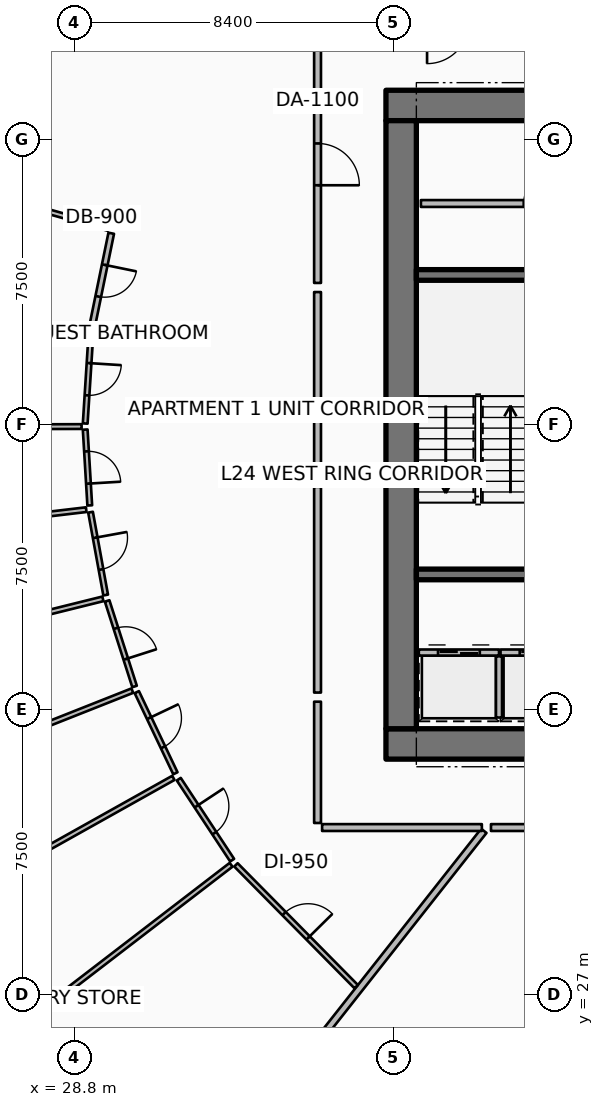
"""IFC4 building model, lengths in metres.
Left out: names, types, materials, properties, quantities, classifications, styles, units other than length and angle.
Written with IfcOpenShell. Run it as: python <this file> out.ifc"""

import sys

from ifc_helpers import new_model, si_unit, direction, frame, frame_2d, origin, place, context, subcontext, project, spatial, rectangle, extrude, element, fill, save


model = new_model("IFC4")
c1 = context("Model", 3, precision=1e-05, world=origin(), true_north=direction((0.0, 1.0)))
c2 = subcontext(c1, "Body", "Model", "MODEL_VIEW")
j1 = project(units=[si_unit("LENGTHUNIT", "METRE"), si_unit("PLANEANGLEUNIT", "RADIAN")], contexts=[c1])
p1 = place(None, origin())
s1 = spatial("IfcSite", under=j1, at=p1, CompositionType="ELEMENT")
p2 = place(p1, origin())
s2 = spatial("IfcBuilding", under=s1, at=p2, CompositionType="ELEMENT")
p3 = place(p2, frame((0.0, 0.0, 97.65)))
s3 = spatial("IfcBuildingStorey", under=s2, at=p3, CompositionType="ELEMENT", Elevation=97.65)
for number, where, z_axis, x_axis in (
    (1, (37.0, 33.6, 0.0), (0.0, 0.0, 1.0), (1.0, 0.0, 0.0)),
    (2, (37.0, 50.4, 0.0), (0.0, 0.0, 1.0), (1.0, 0.0, 0.0)),
):
    element("IfcWall", number, at=place(p3, frame(where, z_axis=z_axis, x_axis=x_axis)), inside=s3, PredefinedType="SHEAR", context=c2, shape_type="SweptSolid", body=[
        extrude(rectangle(XDim=9.9, YDim=0.8, at=frame_2d((4.95, 0.0))), origin(), (0.0, 0.0, 1.0), 3.75),
    ])
p4 = place(p3, frame((37.4, 34.0, 0.0), z_axis=(0.0, 0.0, 1.0), x_axis=(0.0, 1.0, 0.0)))
e3 = element("IfcWall", 3, at=p4, inside=s3, PredefinedType="SHEAR", context=c2, shape_type="SweptSolid", body=[
    extrude(rectangle(XDim=16.0, YDim=0.8, at=frame_2d((8.0, 0.0))), origin(), (0.0, 0.0, 1.0), 3.75),
])
for number, where, z_axis, x_axis in (
    (4, (37.8, 38.06, 0.0), (0.0, 0.0, 1.0), (1.0, 0.0, 0.0)),
    (5, (37.8, 45.94, 0.0), (0.0, 0.0, 1.0), (1.0, 0.0, 0.0)),
):
    element("IfcWall", number, at=place(p3, frame(where, z_axis=z_axis, x_axis=x_axis)), inside=s3, PredefinedType="SHEAR", context=c2, shape_type="SweptSolid", body=[
        extrude(rectangle(XDim=3.5, YDim=0.28, at=frame_2d((1.75, 0.0))), origin(), (0.0, 0.0, 1.0), 3.75),
    ])
p5 = place(p3, frame((37.865, 36.005, 0.0), z_axis=(0.0, 0.0, 1.0), x_axis=(1.0, 0.0, 0.0)))
e6 = element("IfcWall", 6, at=p5, inside=s3, PredefinedType="PARTITIONING", context=c2, shape_type="SweptSolid", body=[
    extrude(rectangle(XDim=2.11, YDim=0.16, at=frame_2d((1.055, 0.0))), origin(), (0.0, 0.0, 1.0), 3.5),
])
p6 = place(p5, frame((0.505, 0.0, 0.0)))
e7 = element("IfcOpeningElement", 7, at=p6, cuts=e6, PredefinedType="OPENING", context=c2, shape_type="SweptSolid", body=[
    extrude(rectangle(XDim=1.1, YDim=2.1, at=frame_2d((0.55, 1.05))), frame((0.0, 0.09, 0.0), z_axis=(0.0, -1.0, 0.0), x_axis=(1.0, 0.0, 0.0)), (0.0, 0.0, 1.0), 0.18),
])
p7 = place(p3, frame((39.975, 34.295, 0.0), z_axis=(0.0, 0.0, 1.0), x_axis=(0.0, 1.0, 0.0)))
e8 = element("IfcWall", 8, at=p7, inside=s3, PredefinedType="PARTITIONING", context=c2, shape_type="SweptSolid", body=[
    extrude(rectangle(XDim=1.61, YDim=0.16, at=frame_2d((0.805, 0.0))), origin(), (0.0, 0.0, 1.0), 3.5),
])
p8 = place(p3, frame((40.015, 36.005, 0.0), z_axis=(0.0, 0.0, 1.0), x_axis=(1.0, 0.0, 0.0)))
e9 = element("IfcWall", 9, at=p8, inside=s3, PredefinedType="PARTITIONING", context=c2, shape_type="SweptSolid", body=[
    extrude(rectangle(XDim=2.11, YDim=0.16, at=frame_2d((1.055, 0.0))), origin(), (0.0, 0.0, 1.0), 3.5),
])
p9 = place(p8, frame((0.505, 0.0, 0.0)))
e10 = element("IfcOpeningElement", 10, at=p9, cuts=e9, PredefinedType="OPENING", context=c2, shape_type="SweptSolid", body=[
    extrude(rectangle(XDim=1.1, YDim=2.1, at=frame_2d((0.55, 1.05))), frame((0.0, 0.09, 0.0), z_axis=(0.0, -1.0, 0.0), x_axis=(1.0, 0.0, 0.0)), (0.0, 0.0, 1.0), 0.18),
])
p10 = place(p3, frame((37.92, 47.82, 0.0), z_axis=(0.0, 0.0, 1.0), x_axis=(1.0, 0.0, 0.0)))
e11 = element("IfcWall", 11, at=p10, inside=s3, PredefinedType="PARTITIONING", context=c2, shape_type="SweptSolid", body=[
    extrude(rectangle(XDim=6.26, YDim=0.18, at=frame_2d((3.13, 0.0))), origin(), (0.0, 0.0, 1.0), 3.5),
])
p11 = place(p10, frame((2.705, 0.0, 0.0)))
e12 = element("IfcOpeningElement", 12, at=p11, cuts=e11, PredefinedType="OPENING", context=c2, shape_type="SweptSolid", body=[
    extrude(rectangle(XDim=0.85, YDim=2.06, at=frame_2d((0.425, 1.03))), frame((0.0, 0.1, 0.0), z_axis=(0.0, -1.0, 0.0), x_axis=(1.0, 0.0, 0.0)), (0.0, 0.0, 1.0), 0.2),
])
p12 = place(p3, frame((39.575, 31.314, 0.0), z_axis=(0.0, 0.0, 1.0), x_axis=(-0.619083417853, -0.785325233098, 0.0)))
e13 = element("IfcWall", 13, at=p12, inside=s3, PredefinedType="PARTITIONING", context=c2, shape_type="SweptSolid", body=[
    extrude(rectangle(XDim=15.063, YDim=0.18, at=frame_2d((7.532, 0.0))), origin(), (0.0, 0.0, 1.0), 2.94),
])
p13 = place(p3, frame((35.2, 51.971, 0.0), z_axis=(0.0, 0.0, 1.0), x_axis=(0.0, -1.0, 0.0)))
e14 = element("IfcWall", 14, at=p13, inside=s3, PredefinedType="PARTITIONING", context=c2, shape_type="SweptSolid", body=[
    extrude(rectangle(XDim=6.241, YDim=0.18, at=frame_2d((3.12, 0.0))), origin(), (0.0, 0.0, 1.0), 2.94),
])
p14 = place(p13, frame((2.57, 0.0, 0.0)))
e15 = element("IfcOpeningElement", 15, at=p14, cuts=e14, PredefinedType="OPENING", context=c2, shape_type="SweptSolid", body=[
    extrude(rectangle(XDim=1.1, YDim=2.1, at=frame_2d((0.55, 1.05))), frame((0.0, 0.1, 0.0), z_axis=(0.0, -1.0, 0.0), x_axis=(1.0, 0.0, 0.0)), (0.0, 0.0, 1.0), 0.2),
])
p15 = place(p3, frame((35.2, 45.49, 0.0), z_axis=(0.0, 0.0, 1.0), x_axis=(0.0, -1.0, 0.0)))
e16 = element("IfcWall", 16, at=p15, inside=s3, PredefinedType="PARTITIONING", context=c2, shape_type="SweptSolid", body=[
    extrude(rectangle(XDim=4.885, YDim=0.18, at=frame_2d((2.442, 0.0))), origin(), (0.0, 0.0, 1.0), 2.94),
])
p16 = place(p3, frame((29.695, 47.163, 0.0), z_axis=(0.0, 0.0, 1.0), x_axis=(-0.962455839824, 0.271438310467, 0.0)))
e17 = element("IfcWall", 17, at=p16, inside=s3, PredefinedType="PARTITIONING", context=c2, shape_type="SweptSolid", body=[
    extrude(rectangle(XDim=9.552, YDim=0.125, at=frame_2d((4.776, 0.0))), origin(), (0.0, 0.0, 1.0), 2.94),
])
p17 = place(p3, frame((29.771, 47.037, 0.0), z_axis=(0.0, 0.0, 1.0), x_axis=(-0.201031337284, -0.979584810739, 0.0)))
e18 = element("IfcWall", 18, at=p17, inside=s3, PredefinedType="PARTITIONING", context=c2, shape_type="SweptSolid", body=[
    extrude(rectangle(XDim=2.549, YDim=0.15, at=frame_2d((1.274, 0.0))), origin(), (0.0, 0.0, 1.0), 2.94),
])
p18 = place(p17, frame((0.85, 0.0, 0.0)))
e19 = element("IfcOpeningElement", 19, at=p18, cuts=e18, PredefinedType="OPENING", context=c2, shape_type="SweptSolid", body=[
    extrude(rectangle(XDim=0.85, YDim=2.06, at=frame_2d((0.425, 1.03))), frame((0.0, 0.085, 0.0), z_axis=(0.0, -1.0, 0.0), x_axis=(1.0, 0.0, 0.0)), (0.0, 0.0, 1.0), 0.17),
])
p19 = place(p3, frame((29.151, 44.464, 0.0), z_axis=(0.0, 0.0, 1.0), x_axis=(-0.991563130501, 0.129624682181, 0.0)))
e20 = element("IfcWall", 20, at=p19, inside=s3, PredefinedType="PARTITIONING", context=c2, shape_type="SweptSolid", body=[
    extrude(rectangle(XDim=4.46, YDim=0.15, at=frame_2d((2.23, 0.0))), origin(), (0.0, 0.0, 1.0), 2.94),
])
p20 = place(p3, frame((28.991, 41.951, 0.0), z_axis=(0.0, 0.0, 1.0), x_axis=(-0.999996643903, -0.002590788034, 0.0)))
e21 = element("IfcWall", 21, at=p20, inside=s3, PredefinedType="PARTITIONING", context=c2, shape_type="SweptSolid", body=[
    extrude(rectangle(XDim=10.271, YDim=0.125, at=frame_2d((5.136, 0.0))), origin(), (0.0, 0.0, 1.0), 2.94),
])
p21 = place(p3, frame((29.235, 44.362, 0.0), z_axis=(0.0, 0.0, 1.0), x_axis=(-0.063647003528, -0.99797247404, 0.0)))
e22 = element("IfcWall", 22, at=p21, inside=s3, PredefinedType="PARTITIONING", context=c2, shape_type="SweptSolid", body=[
    extrude(rectangle(XDim=2.336, YDim=0.125, at=frame_2d((1.168, 0.0))), origin(), (0.0, 0.0, 1.0), 2.94),
])
p22 = place(p21, frame((0.743, 0.0, 0.0)))
e23 = element("IfcOpeningElement", 23, at=p22, cuts=e22, PredefinedType="OPENING", context=c2, shape_type="SweptSolid", body=[
    extrude(rectangle(XDim=0.85, YDim=2.06, at=frame_2d((0.425, 1.03))), frame((0.0, 0.073, 0.0), z_axis=(0.0, -1.0, 0.0), x_axis=(1.0, 0.0, 0.0)), (0.0, 0.0, 1.0), 0.145),
])
p23 = place(p3, frame((29.086, 41.871, 0.0), z_axis=(0.0, 0.0, 1.0), x_axis=(0.060104090143, -0.99819211495, 0.0)))
e24 = element("IfcWall", 24, at=p23, inside=s3, PredefinedType="PARTITIONING", context=c2, shape_type="SweptSolid", body=[
    extrude(rectangle(XDim=1.999, YDim=0.125, at=frame_2d((0.999, 0.0))), origin(), (0.0, 0.0, 1.0), 2.94),
])
p24 = place(p23, frame((0.574, 0.0, 0.0)))
e25 = element("IfcOpeningElement", 25, at=p24, cuts=e24, PredefinedType="OPENING", context=c2, shape_type="SweptSolid", body=[
    extrude(rectangle(XDim=0.85, YDim=2.06, at=frame_2d((0.425, 1.03))), frame((0.0, 0.073, 0.0), z_axis=(0.0, -1.0, 0.0), x_axis=(1.0, 0.0, 0.0)), (0.0, 0.0, 1.0), 0.145),
])
p25 = place(p3, frame((35.2, 40.365, 0.0), z_axis=(0.0, 0.0, 1.0), x_axis=(0.0, -1.0, 0.0)))
e26 = element("IfcWall", 26, at=p25, inside=s3, PredefinedType="PARTITIONING", context=c2, shape_type="SweptSolid", body=[
    extrude(rectangle(XDim=5.413, YDim=0.18, at=frame_2d((2.707, 0.0))), origin(), (0.0, 0.0, 1.0), 2.94),
])
p26 = place(p3, frame((29.113, 39.764, 0.0), z_axis=(0.0, 0.0, 1.0), x_axis=(-0.993070875002, -0.117516965677, 0.0)))
e27 = element("IfcWall", 27, at=p26, inside=s3, PredefinedType="PARTITIONING", context=c2, shape_type="SweptSolid", body=[
    extrude(rectangle(XDim=10.46, YDim=0.125, at=frame_2d((5.23, 0.0))), origin(), (0.0, 0.0, 1.0), 2.94),
])
p27 = place(p3, frame((29.552, 37.417, 0.0), z_axis=(0.0, 0.0, 1.0), x_axis=(-0.970504192203, -0.241084244437, 0.0)))
e28 = element("IfcWall", 28, at=p27, inside=s3, PredefinedType="PARTITIONING", context=c2, shape_type="SweptSolid", body=[
    extrude(rectangle(XDim=9.976, YDim=0.125, at=frame_2d((4.988, 0.0))), origin(), (0.0, 0.0, 1.0), 2.94),
])
p28 = place(p3, frame((30.326, 35.002, 0.0), z_axis=(0.0, 0.0, 1.0), x_axis=(-0.929777602375, -0.368121732748, 0.0)))
e29 = element("IfcWall", 29, at=p28, inside=s3, PredefinedType="PARTITIONING", context=c2, shape_type="SweptSolid", body=[
    extrude(rectangle(XDim=9.961, YDim=0.125, at=frame_2d((4.98, 0.0))), origin(), (0.0, 0.0, 1.0), 2.94),
])
p29 = place(p3, frame((29.227, 39.698, 0.0), z_axis=(0.0, 0.0, 1.0), x_axis=(0.179602920825, -0.983739188419, 0.0)))
e30 = element("IfcWall", 30, at=p29, inside=s3, PredefinedType="PARTITIONING", context=c2, shape_type="SweptSolid", body=[
    extrude(rectangle(XDim=2.216, YDim=0.125, at=frame_2d((1.108, 0.0))), origin(), (0.0, 0.0, 1.0), 2.94),
])
p30 = place(p29, frame((0.683, 0.0, 0.0)))
e31 = element("IfcOpeningElement", 31, at=p30, cuts=e30, PredefinedType="OPENING", context=c2, shape_type="SweptSolid", body=[
    extrude(rectangle(XDim=0.85, YDim=2.06, at=frame_2d((0.425, 1.03))), frame((0.0, 0.073, 0.0), z_axis=(0.0, -1.0, 0.0), x_axis=(1.0, 0.0, 0.0)), (0.0, 0.0, 1.0), 0.145),
])
p31 = place(p3, frame((29.663, 37.363, 0.0), z_axis=(0.0, 0.0, 1.0), x_axis=(0.305393983716, -0.952226083822, 0.0)))
e32 = element("IfcWall", 32, at=p31, inside=s3, PredefinedType="PARTITIONING", context=c2, shape_type="SweptSolid", body=[
    extrude(rectangle(XDim=2.364, YDim=0.125, at=frame_2d((1.182, 0.0))), origin(), (0.0, 0.0, 1.0), 2.94),
])
p32 = place(p31, frame((0.757, 0.0, 0.0)))
e33 = element("IfcOpeningElement", 33, at=p32, cuts=e32, PredefinedType="OPENING", context=c2, shape_type="SweptSolid", body=[
    extrude(rectangle(XDim=0.85, YDim=2.06, at=frame_2d((0.425, 1.03))), frame((0.0, 0.073, 0.0), z_axis=(0.0, -1.0, 0.0), x_axis=(1.0, 0.0, 0.0)), (0.0, 0.0, 1.0), 0.145),
])
p33 = place(p3, frame((30.444, 34.963, 0.0), z_axis=(0.0, 0.0, 1.0), x_axis=(0.429404357622, -0.903112339443, 0.0)))
e34 = element("IfcWall", 34, at=p33, inside=s3, PredefinedType="PARTITIONING", context=c2, shape_type="SweptSolid", body=[
    extrude(rectangle(XDim=2.364, YDim=0.125, at=frame_2d((1.182, 0.0))), origin(), (0.0, 0.0, 1.0), 2.94),
])
p34 = place(p33, frame((0.757, 0.0, 0.0)))
e35 = element("IfcOpeningElement", 35, at=p34, cuts=e34, PredefinedType="OPENING", context=c2, shape_type="SweptSolid", body=[
    extrude(rectangle(XDim=0.85, YDim=2.06, at=frame_2d((0.425, 1.03))), frame((0.0, 0.073, 0.0), z_axis=(0.0, -1.0, 0.0), x_axis=(1.0, 0.0, 0.0)), (0.0, 0.0, 1.0), 0.145),
])
p35 = place(p3, frame((35.2, 34.712, 0.0), z_axis=(0.0, 0.0, 1.0), x_axis=(0.0, -1.0, 0.0)))
e36 = element("IfcWall", 36, at=p35, inside=s3, PredefinedType="PARTITIONING", context=c2, shape_type="SweptSolid", body=[
    extrude(rectangle(XDim=3.192, YDim=0.18, at=frame_2d((1.596, 0.0))), origin(), (0.0, 0.0, 1.0), 2.94),
])
p36 = place(p3, frame((35.32, 31.4, 0.0), z_axis=(0.0, 0.0, 1.0), x_axis=(1.0, 0.0, 0.0)))
e37 = element("IfcWall", 37, at=p36, inside=s3, PredefinedType="PARTITIONING", context=c2, shape_type="SweptSolid", body=[
    extrude(rectangle(XDim=4.204, YDim=0.18, at=frame_2d((2.102, 0.0))), origin(), (0.0, 0.0, 1.0), 2.94),
])
p37 = place(p3, frame((31.406, 32.707, 0.0), z_axis=(0.0, 0.0, 1.0), x_axis=(-0.872500841978, -0.488612608052, 0.0)))
e38 = element("IfcWall", 38, at=p37, inside=s3, PredefinedType="PARTITIONING", context=c2, shape_type="SweptSolid", body=[
    extrude(rectangle(XDim=10.46, YDim=0.125, at=frame_2d((5.23, 0.0))), origin(), (0.0, 0.0, 1.0), 2.94),
])
p38 = place(p3, frame((32.925, 30.42, 0.0), z_axis=(0.0, 0.0, 1.0), x_axis=(-0.793033627653, -0.609177860244, 0.0)))
e39 = element("IfcWall", 39, at=p38, inside=s3, PredefinedType="PARTITIONING", context=c2, shape_type="SweptSolid", body=[
    extrude(rectangle(XDim=10.099, YDim=0.125, at=frame_2d((5.049, 0.0))), origin(), (0.0, 0.0, 1.0), 2.94),
])
p39 = place(p3, frame((31.548, 32.672, 0.0), z_axis=(0.0, 0.0, 1.0), x_axis=(0.550387635728, -0.834909246827, 0.0)))
e40 = element("IfcWall", 40, at=p39, inside=s3, PredefinedType="PARTITIONING", context=c2, shape_type="SweptSolid", body=[
    extrude(rectangle(XDim=2.552, YDim=0.125, at=frame_2d((1.276, 0.0))), origin(), (0.0, 0.0, 1.0), 2.94),
])
p40 = place(p39, frame((0.851, 0.0, 0.0)))
e41 = element("IfcOpeningElement", 41, at=p40, cuts=e40, PredefinedType="OPENING", context=c2, shape_type="SweptSolid", body=[
    extrude(rectangle(XDim=0.85, YDim=2.06, at=frame_2d((0.425, 1.03))), frame((0.0, 0.073, 0.0), z_axis=(0.0, -1.0, 0.0), x_axis=(1.0, 0.0, 0.0)), (0.0, 0.0, 1.0), 0.145),
])
p41 = place(p3, frame((33.053, 30.418, 0.0), z_axis=(0.0, 0.0, 1.0), x_axis=(0.702647387595, -0.711538227157, 0.0)))
e42 = element("IfcWall", 42, at=p41, inside=s3, PredefinedType="PARTITIONING", context=c2, shape_type="SweptSolid", body=[
    extrude(rectangle(XDim=4.503, YDim=0.125, at=frame_2d((2.252, 0.0))), origin(), (0.0, 0.0, 1.0), 2.94),
])
p42 = place(p41, frame((1.802, 0.0, 0.0)))
e43 = element("IfcOpeningElement", 43, at=p42, cuts=e42, PredefinedType="OPENING", context=c2, shape_type="SweptSolid", body=[
    extrude(rectangle(XDim=0.9, YDim=2.08, at=frame_2d((0.45, 1.04))), frame((0.0, 0.073, 0.0), z_axis=(0.0, -1.0, 0.0), x_axis=(1.0, 0.0, 0.0)), (0.0, 0.0, 1.0), 0.145),
])
p43 = place(p3, frame((39.764, 31.4, 0.0), z_axis=(0.0, 0.0, 1.0), x_axis=(1.0, 0.0, 0.0)))
e44 = element("IfcWall", 44, at=p43, inside=s3, PredefinedType="PARTITIONING", context=c2, shape_type="SweptSolid", body=[
    extrude(rectangle(XDim=5.127, YDim=0.18, at=frame_2d((2.563, 0.0))), origin(), (0.0, 0.0, 1.0), 2.94),
])
p44 = place(p43, frame((2.013, 0.0, 0.0)))
e45 = element("IfcOpeningElement", 45, at=p44, cuts=e44, PredefinedType="OPENING", context=c2, shape_type="SweptSolid", body=[
    extrude(rectangle(XDim=1.1, YDim=2.1, at=frame_2d((0.55, 1.05))), frame((0.0, 0.1, 0.0), z_axis=(0.0, -1.0, 0.0), x_axis=(1.0, 0.0, 0.0)), (0.0, 0.0, 1.0), 0.2),
])
p45 = place(p6, origin())
e46 = element("IfcDoor", 46, at=p45, inside=s3, OperationType="DOUBLE_DOOR_SLIDING", PredefinedType="DOOR", context=c2, shape_type="SweptSolid", body=[
    extrude(rectangle(XDim=1.1, YDim=2.1, at=frame_2d((0.55, 1.05))), frame((0.0, 0.025, 0.0), z_axis=(0.0, -1.0, 0.0), x_axis=(1.0, 0.0, 0.0)), (0.0, 0.0, 1.0), 0.05),
])
fill(e7, e46)
p46 = place(p9, origin())
e47 = element("IfcDoor", 47, at=p46, inside=s3, OperationType="DOUBLE_DOOR_SLIDING", PredefinedType="DOOR", context=c2, shape_type="SweptSolid", body=[
    extrude(rectangle(XDim=1.1, YDim=2.1, at=frame_2d((0.55, 1.05))), frame((0.0, 0.025, 0.0), z_axis=(0.0, -1.0, 0.0), x_axis=(1.0, 0.0, 0.0)), (0.0, 0.0, 1.0), 0.05),
])
fill(e10, e47)
p47 = place(p11, origin())
e48 = element("IfcDoor", 48, at=p47, inside=s3, OperationType="SINGLE_SWING_RIGHT", PredefinedType="DOOR", context=c2, shape_type="SweptSolid", body=[
    extrude(rectangle(XDim=0.85, YDim=2.06, at=frame_2d((0.425, 1.03))), frame((0.0, 0.025, 0.0), z_axis=(0.0, -1.0, 0.0), x_axis=(1.0, 0.0, 0.0)), (0.0, 0.0, 1.0), 0.05),
])
fill(e12, e48)
p48 = place(p14, origin())
e49 = element("IfcDoor", 49, at=p48, inside=s3, OperationType="SINGLE_SWING_RIGHT", PredefinedType="DOOR", context=c2, shape_type="SweptSolid", body=[
    extrude(rectangle(XDim=1.1, YDim=2.1, at=frame_2d((0.55, 1.05))), frame((0.0, 0.025, 0.0), z_axis=(0.0, -1.0, 0.0), x_axis=(1.0, 0.0, 0.0)), (0.0, 0.0, 1.0), 0.05),
])
fill(e15, e49)
p49 = place(p18, origin())
e50 = element("IfcDoor", 50, at=p49, inside=s3, OperationType="SINGLE_SWING_LEFT", PredefinedType="DOOR", context=c2, shape_type="SweptSolid", body=[
    extrude(rectangle(XDim=0.85, YDim=2.06, at=frame_2d((0.425, 1.03))), frame((0.0, 0.025, 0.0), z_axis=(0.0, -1.0, 0.0), x_axis=(1.0, 0.0, 0.0)), (0.0, 0.0, 1.0), 0.05),
])
fill(e19, e50)
p50 = place(p22, origin())
e51 = element("IfcDoor", 51, at=p50, inside=s3, OperationType="SINGLE_SWING_LEFT", PredefinedType="DOOR", context=c2, shape_type="SweptSolid", body=[
    extrude(rectangle(XDim=0.85, YDim=2.06, at=frame_2d((0.425, 1.03))), frame((0.0, 0.025, 0.0), z_axis=(0.0, -1.0, 0.0), x_axis=(1.0, 0.0, 0.0)), (0.0, 0.0, 1.0), 0.05),
])
fill(e23, e51)
p51 = place(p24, origin())
e52 = element("IfcDoor", 52, at=p51, inside=s3, OperationType="SINGLE_SWING_RIGHT", PredefinedType="DOOR", context=c2, shape_type="SweptSolid", body=[
    extrude(rectangle(XDim=0.85, YDim=2.06, at=frame_2d((0.425, 1.03))), frame((0.0, 0.025, 0.0), z_axis=(0.0, -1.0, 0.0), x_axis=(1.0, 0.0, 0.0)), (0.0, 0.0, 1.0), 0.05),
])
fill(e25, e52)
p52 = place(p30, origin())
e53 = element("IfcDoor", 53, at=p52, inside=s3, OperationType="SINGLE_SWING_LEFT", PredefinedType="DOOR", context=c2, shape_type="SweptSolid", body=[
    extrude(rectangle(XDim=0.85, YDim=2.06, at=frame_2d((0.425, 1.03))), frame((0.0, 0.025, 0.0), z_axis=(0.0, -1.0, 0.0), x_axis=(1.0, 0.0, 0.0)), (0.0, 0.0, 1.0), 0.05),
])
fill(e31, e53)
p53 = place(p32, origin())
e54 = element("IfcDoor", 54, at=p53, inside=s3, OperationType="SINGLE_SWING_RIGHT", PredefinedType="DOOR", context=c2, shape_type="SweptSolid", body=[
    extrude(rectangle(XDim=0.85, YDim=2.06, at=frame_2d((0.425, 1.03))), frame((0.0, 0.025, 0.0), z_axis=(0.0, -1.0, 0.0), x_axis=(1.0, 0.0, 0.0)), (0.0, 0.0, 1.0), 0.05),
])
fill(e33, e54)
p54 = place(p34, origin())
e55 = element("IfcDoor", 55, at=p54, inside=s3, OperationType="SINGLE_SWING_LEFT", PredefinedType="DOOR", context=c2, shape_type="SweptSolid", body=[
    extrude(rectangle(XDim=0.85, YDim=2.06, at=frame_2d((0.425, 1.03))), frame((0.0, 0.025, 0.0), z_axis=(0.0, -1.0, 0.0), x_axis=(1.0, 0.0, 0.0)), (0.0, 0.0, 1.0), 0.05),
])
fill(e35, e55)
p55 = place(p40, origin())
e56 = element("IfcDoor", 56, at=p55, inside=s3, OperationType="SINGLE_SWING_LEFT", PredefinedType="DOOR", context=c2, shape_type="SweptSolid", body=[
    extrude(rectangle(XDim=0.85, YDim=2.06, at=frame_2d((0.425, 1.03))), frame((0.0, 0.025, 0.0), z_axis=(0.0, -1.0, 0.0), x_axis=(1.0, 0.0, 0.0)), (0.0, 0.0, 1.0), 0.05),
])
fill(e41, e56)
p56 = place(p42, origin())
e57 = element("IfcDoor", 57, at=p56, inside=s3, OperationType="SINGLE_SWING_RIGHT", PredefinedType="DOOR", context=c2, shape_type="SweptSolid", body=[
    extrude(rectangle(XDim=0.9, YDim=2.08, at=frame_2d((0.45, 1.04))), frame((0.0, 0.025, 0.0), z_axis=(0.0, -1.0, 0.0), x_axis=(1.0, 0.0, 0.0)), (0.0, 0.0, 1.0), 0.05),
])
fill(e43, e57)
save(model, sys.argv[1])
